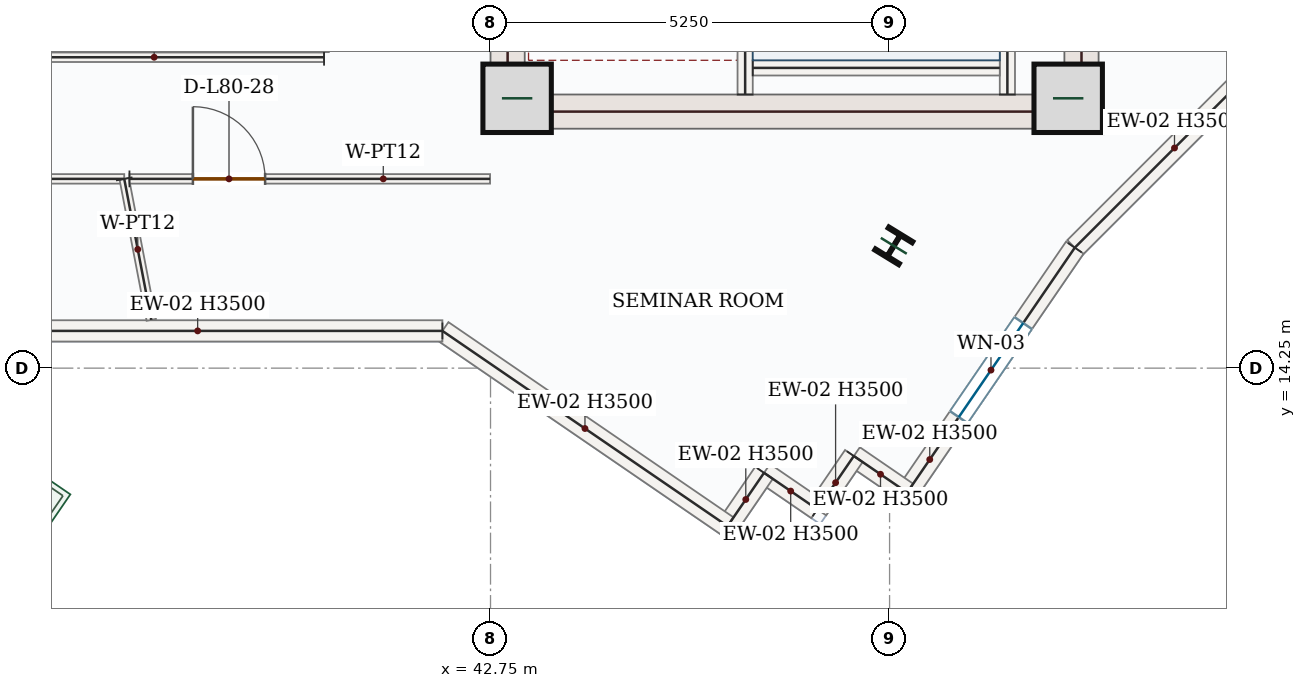
"""IFC4 building model, lengths in metres.
Left out: names, types, materials, properties, quantities, classifications, styles, units other than length and angle.
Written with IfcOpenShell. Run it as: python <this file> out.ifc"""

import sys

from ifc_helpers import new_model, si_unit, direction, frame, frame_2d, origin, origin_2d, place, context, subcontext, project, spatial, rectangle, i_section, extrude, source, transform, mapped, element, fill, save


model = new_model("IFC4")
c1 = context("Model", 3, precision=1e-05, world=origin(), true_north=direction((0.0, 1.0)))
c2 = subcontext(c1, "Body", "Model", "MODEL_VIEW")
j1 = project(units=[si_unit("LENGTHUNIT", "METRE"), si_unit("PLANEANGLEUNIT", "RADIAN")], contexts=[c1])
p1 = place(None, origin())
s1 = spatial("IfcSite", under=j1, at=p1, CompositionType="ELEMENT")
p2 = place(p1, origin())
s2 = spatial("IfcBuilding", under=s1, at=p2, CompositionType="ELEMENT")
p3 = place(p2, frame((0.0, 0.0, 331.05)))
s3 = spatial("IfcBuildingStorey", under=s2, at=p3, CompositionType="ELEMENT", Elevation=331.05)
p4 = place(p3, frame((42.975, 17.4, 0.0), z_axis=(0.0, 0.0, 1.0), x_axis=(0.0, 1.0, 0.0)))
e1 = element("IfcWall", 1, at=p4, inside=s3, PredefinedType="SHEAR", context=c2, shape_type="SweptSolid", body=[
    extrude(rectangle(XDim=8.55, YDim=0.45, at=frame_2d((4.275, 0.0))), origin(), (0.0, 0.0, 1.0), 3.5),
])
p5 = place(p4, frame((6.65, 0.0, 0.0)))
e2 = element("IfcOpeningElement", 2, at=p5, cuts=e1, PredefinedType="OPENING", context=c2, shape_type="SweptSolid", body=[
    extrude(rectangle(XDim=1.1, YDim=2.2, at=frame_2d((0.55, 1.1))), frame((0.0, 0.235, 0.0), z_axis=(0.0, -1.0, 0.0), x_axis=(1.0, 0.0, 0.0)), (0.0, 0.0, 1.0), 0.47),
])
p6 = place(p4, frame((1.75, 0.0, 0.0)))
e3 = element("IfcOpeningElement", 3, at=p6, cuts=e1, PredefinedType="OPENING", context=c2, shape_type="SweptSolid", body=[
    extrude(rectangle(XDim=1.3, YDim=2.2, at=frame_2d((0.65, 1.1))), frame((0.0, 0.235, 0.0), z_axis=(0.0, -1.0, 0.0), x_axis=(1.0, 0.0, 0.0)), (0.0, 0.0, 1.0), 0.47),
])
p7 = place(p4, frame((4.55, 0.0, 0.0)))
e4 = element("IfcOpeningElement", 4, at=p7, cuts=e1, PredefinedType="OPENING", context=c2, shape_type="SweptSolid", body=[
    extrude(rectangle(XDim=0.88, YDim=2.1, at=frame_2d((0.44, 1.05))), frame((0.0, 0.235, 0.0), z_axis=(0.0, -1.0, 0.0), x_axis=(1.0, 0.0, 0.0)), (0.0, 0.0, 1.0), 0.47),
])
m1 = source(origin(), c2, "Body", "SweptSolid", [
    extrude(rectangle(XDim=8.55, YDim=0.45, at=frame_2d((4.275, 0.0))), origin(), (0.0, 0.0, 1.0), 3.5),
])
p8 = place(p3, frame((50.525, 17.4, 0.0), z_axis=(0.0, 0.0, 1.0), x_axis=(0.0, 1.0, 0.0)))
e5 = element("IfcWall", 5, at=p8, inside=s3, PredefinedType="SHEAR", context=c2, shape_type="MappedRepresentation", body=[
    mapped(m1, transform((0.0, 0.0, 0.0), x_axis=(1.0, 0.0, 0.0), y_axis=(0.0, 1.0, 0.0), z_axis=(0.0, 0.0, 1.0), scale=1.0)),
])
m2 = source(origin(), c2, "Body", "SweptSolid", [
    extrude(rectangle(XDim=7.1, YDim=0.45, at=frame_2d((3.55, 0.0))), origin(), (0.0, 0.0, 1.0), 3.5),
])
p9 = place(p3, frame((43.2, 17.625, 0.0), z_axis=(0.0, 0.0, 1.0), x_axis=(1.0, 0.0, 0.0)))
e6 = element("IfcWall", 6, at=p9, inside=s3, PredefinedType="SHEAR", context=c2, shape_type="MappedRepresentation", body=[
    mapped(m2, transform((0.0, 0.0, 0.0), x_axis=(1.0, 0.0, 0.0), y_axis=(0.0, 1.0, 0.0), z_axis=(0.0, 0.0, 1.0), scale=1.0)),
])
m3 = source(origin(), c2, "Body", "SweptSolid", [
    extrude(rectangle(XDim=0.9, YDim=0.9, at=origin_2d()), origin(), (0.0, 0.0, 1.0), 3.75),
])
for number, where, z_axis, x_axis in (
    (7, (43.1, 17.8, 0.0), (0.0, 0.0, 1.0), (1.0, 0.0, 0.0)),
    (8, (50.35, 17.8, 0.0), (0.0, 0.0, 1.0), (1.0, 0.0, 0.0)),
):
    element("IfcColumn", number, at=place(p3, frame(where, z_axis=z_axis, x_axis=x_axis)), inside=s3, PredefinedType="COLUMN", context=c2, shape_type="MappedRepresentation", body=[
        mapped(m3, transform((0.0, 0.0, 0.0), x_axis=(1.0, 0.0, 0.0), y_axis=(0.0, 1.0, 0.0), z_axis=(0.0, 0.0, 1.0), scale=1.0)),
    ])
m4 = source(origin(), c2, "Body", "SweptSolid", [
    extrude(i_section(OverallWidth=0.369, OverallDepth=0.356, WebThickness=0.011, FlangeThickness=0.018, FilletRadius=0.018, at=origin_2d()), origin(), (0.0, 0.0, 1.0), 3.75),
])
p10 = place(p3, frame((48.055, 15.859, 0.0), z_axis=(0.0, 0.0, 1.0), x_axis=(-0.852640164354, 0.522498564716, 0.0)))
e9 = element("IfcColumn", 9, at=p10, inside=s3, PredefinedType="COLUMN", context=c2, shape_type="MappedRepresentation", body=[
    mapped(m4, transform((0.0, 0.0, 0.0), x_axis=(1.0, 0.0, 0.0), y_axis=(0.0, 1.0, 0.0), z_axis=(0.0, 0.0, 1.0), scale=1.0)),
])
m5 = source(origin(), c2, "Body", "SweptSolid", [
    extrude(rectangle(XDim=3.709, YDim=0.28, at=frame_2d((1.855, 0.0))), origin(), (0.0, 0.0, 1.0), 3.5),
])
p11 = place(p3, frame((53.06, 18.458, 0.0), z_axis=(0.0, 0.0, 1.0), x_axis=(-0.707106781187, -0.707106781187, 0.0)))
e10 = element("IfcWall", 10, at=p11, inside=s3, PredefinedType="SOLIDWALL", context=c2, shape_type="MappedRepresentation", body=[
    mapped(m5, transform((0.0, 0.0, 0.0), x_axis=(1.0, 0.0, 0.0), y_axis=(0.0, 1.0, 0.0), z_axis=(0.0, 0.0, 1.0), scale=1.0)),
])
p12 = place(p3, frame((50.437, 15.835, 0.0), z_axis=(0.0, 0.0, 1.0), x_axis=(-0.564961879511, -0.825117006672, 0.0)))
e11 = element("IfcWall", 11, at=p12, inside=s3, PredefinedType="SOLIDWALL", context=c2, shape_type="SweptSolid", body=[
    extrude(rectangle(XDim=3.904, YDim=0.28, at=frame_2d((1.952, 0.0))), origin(), (0.0, 0.0, 1.0), 3.5),
])
p13 = place(p12, frame((1.202, 0.0, 0.85)))
e12 = element("IfcOpeningElement", 12, at=p13, cuts=e11, PredefinedType="OPENING", context=c2, shape_type="SweptSolid", body=[
    extrude(rectangle(XDim=1.5, YDim=1.5, at=frame_2d((0.75, 0.75))), frame((0.0, 0.15, 0.0), z_axis=(0.0, -1.0, 0.0), x_axis=(1.0, 0.0, 0.0)), (0.0, 0.0, 1.0), 0.3),
])
m6 = source(origin(), c2, "Body", "SweptSolid", [
    extrude(rectangle(XDim=0.85, YDim=0.28, at=frame_2d((0.425, 0.0))), origin(), (0.0, 0.0, 1.0), 3.5),
])
for number, where, z_axis, x_axis in (
    (13, (48.231, 12.614, 0.0), (0.0, 0.0, 1.0), (-0.825, 0.565, 0.0)),
    (14, (47.53, 13.094, 0.0), (0.0, 0.0, 1.0), (-0.565, -0.825, 0.0)),
    (15, (47.05, 12.393, 0.0), (0.0, 0.0, 1.0), (-0.825, 0.565, 0.0)),
    (16, (46.348, 12.873, 0.0), (0.0, 0.0, 1.0), (-0.565, -0.825, 0.0)),
):
    element("IfcWall", number, at=place(p3, frame(where, z_axis=z_axis, x_axis=x_axis)), inside=s3, PredefinedType="SOLIDWALL", context=c2, shape_type="MappedRepresentation", body=[
        mapped(m6, transform((0.0, 0.0, 0.0), x_axis=(1.0, 0.0, 0.0), y_axis=(0.0, 1.0, 0.0), z_axis=(0.0, 0.0, 1.0), scale=1.0)),
    ])
m7 = source(origin(), c2, "Body", "SweptSolid", [
    extrude(rectangle(XDim=4.546, YDim=0.28, at=frame_2d((2.273, 0.0))), origin(), (0.0, 0.0, 1.0), 3.5),
])
p14 = place(p3, frame((45.868, 12.171, 0.0), z_axis=(0.0, 0.0, 1.0), x_axis=(-0.825104362901, 0.564980345075, 0.0)))
e17 = element("IfcWall", 17, at=p14, inside=s3, PredefinedType="SOLIDWALL", context=c2, shape_type="MappedRepresentation", body=[
    mapped(m7, transform((0.0, 0.0, 0.0), x_axis=(1.0, 0.0, 0.0), y_axis=(0.0, 1.0, 0.0), z_axis=(0.0, 0.0, 1.0), scale=1.0)),
])
m8 = source(origin(), c2, "Body", "SweptSolid", [
    extrude(rectangle(XDim=6.44, YDim=0.28, at=frame_2d((3.22, 0.0))), origin(), (0.0, 0.0, 1.0), 3.5),
])
p15 = place(p3, frame((42.117, 14.74, 0.0), z_axis=(0.0, 0.0, 1.0), x_axis=(-1.0, 0.0, 0.0)))
e18 = element("IfcWall", 18, at=p15, inside=s3, PredefinedType="SOLIDWALL", context=c2, shape_type="MappedRepresentation", body=[
    mapped(m8, transform((0.0, 0.0, 0.0), x_axis=(1.0, 0.0, 0.0), y_axis=(0.0, 1.0, 0.0), z_axis=(0.0, 0.0, 1.0), scale=1.0)),
])
m9 = source(origin(), c2, "Body", "SweptSolid", [
    extrude(rectangle(XDim=7.87, YDim=0.2, at=frame_2d((3.935, 0.0))), origin(), (0.0, 0.0, 1.0), 3.5),
])
p16 = place(p3, frame((49.55, 17.85, 0.0), z_axis=(0.0, 0.0, 1.0), x_axis=(0.0, 1.0, 0.0)))
e19 = element("IfcWall", 19, at=p16, inside=s3, PredefinedType="SOLIDWALL", context=c2, shape_type="MappedRepresentation", body=[
    mapped(m9, transform((0.0, 0.0, 0.0), x_axis=(1.0, 0.0, 0.0), y_axis=(0.0, 1.0, 0.0), z_axis=(0.0, 0.0, 1.0), scale=1.0)),
])
p17 = place(p3, frame((46.1, 17.85, 0.0), z_axis=(0.0, 0.0, 1.0), x_axis=(0.0, 1.0, 0.0)))
e20 = element("IfcWall", 20, at=p17, inside=s3, PredefinedType="SOLIDWALL", context=c2, shape_type="SweptSolid", body=[
    extrude(rectangle(XDim=8.0, YDim=0.2, at=frame_2d((4.0, 0.0))), origin(), (0.0, 0.0, 1.0), 3.5),
])
p18 = place(p17, frame((6.3, 0.0, 0.0)))
e21 = element("IfcOpeningElement", 21, at=p18, cuts=e20, PredefinedType="OPENING", context=c2, shape_type="SweptSolid", body=[
    extrude(rectangle(XDim=1.05, YDim=2.15, at=frame_2d((0.525, 1.075))), frame((0.0, 0.11, 0.0), z_axis=(0.0, -1.0, 0.0), x_axis=(1.0, 0.0, 0.0)), (0.0, 0.0, 1.0), 0.22),
])
m10 = source(origin(), c2, "Body", "SweptSolid", [
    extrude(rectangle(XDim=3.25, YDim=0.2, at=frame_2d((1.625, 0.0))), origin(), (0.0, 0.0, 1.0), 3.5),
])
p19 = place(p3, frame((46.2, 18.2, 0.0), z_axis=(0.0, 0.0, 1.0), x_axis=(1.0, 0.0, 0.0)))
e22 = element("IfcWall", 22, at=p19, inside=s3, PredefinedType="SOLIDWALL", context=c2, shape_type="MappedRepresentation", body=[
    mapped(m10, transform((0.0, 0.0, 0.0), x_axis=(1.0, 0.0, 0.0), y_axis=(0.0, 1.0, 0.0), z_axis=(0.0, 0.0, 1.0), scale=1.0)),
])
m11 = source(origin(), c2, "Body", "SweptSolid", [
    extrude(rectangle(XDim=4.47, YDim=0.125, at=frame_2d((2.235, 0.0))), origin(), (0.0, 0.0, 1.0), 3.5),
])
p20 = place(p3, frame((40.56, 18.34, 0.0), z_axis=(0.0, 0.0, 1.0), x_axis=(-1.0, 0.0, 0.0)))
e23 = element("IfcWall", 23, at=p20, inside=s3, PredefinedType="PARTITIONING", context=c2, shape_type="MappedRepresentation", body=[
    mapped(m11, transform((0.0, 0.0, 0.0), x_axis=(1.0, 0.0, 0.0), y_axis=(0.0, 1.0, 0.0), z_axis=(0.0, 0.0, 1.0), scale=1.0)),
])
p21 = place(p3, frame((32.235, 16.74, 0.0), z_axis=(0.0, 0.0, 1.0), x_axis=(1.0, 0.0, 0.0)))
e24 = element("IfcWall", 24, at=p21, inside=s3, PredefinedType="PARTITIONING", context=c2, shape_type="SweptSolid", body=[
    extrude(rectangle(XDim=5.696, YDim=0.125, at=frame_2d((2.848, 0.0))), origin(), (0.0, 0.0, 1.0), 3.5),
])
p22 = place(p21, frame((3.085, 0.0, 0.0)))
e25 = element("IfcOpeningElement", 25, at=p22, cuts=e24, PredefinedType="OPENING", context=c2, shape_type="SweptSolid", body=[
    extrude(rectangle(XDim=0.95, YDim=2.15, at=frame_2d((0.475, 1.075))), frame((0.0, 0.073, 0.0), z_axis=(0.0, -1.0, 0.0), x_axis=(1.0, 0.0, 0.0)), (0.0, 0.0, 1.0), 0.145),
])
m12 = source(origin(), c2, "Body", "SweptSolid", [
    extrude(rectangle(XDim=1.889, YDim=0.125, at=frame_2d((0.944, 0.0))), origin(), (0.0, 0.0, 1.0), 3.5),
])
p23 = place(p3, frame((37.931, 16.74, 0.0), z_axis=(0.0, 0.0, 1.0), x_axis=(0.188454265316, -0.982081966989, 0.0)))
e26 = element("IfcWall", 26, at=p23, inside=s3, PredefinedType="PARTITIONING", context=c2, shape_type="MappedRepresentation", body=[
    mapped(m12, transform((0.0, 0.0, 0.0), x_axis=(1.0, 0.0, 0.0), y_axis=(0.0, 1.0, 0.0), z_axis=(0.0, 0.0, 1.0), scale=1.0)),
])
p24 = place(p3, frame((38.0, 16.74, 0.0), z_axis=(0.0, 0.0, 1.0), x_axis=(1.0, 0.0, 0.0)))
e27 = element("IfcWall", 27, at=p24, inside=s3, PredefinedType="PARTITIONING", context=c2, shape_type="SweptSolid", body=[
    extrude(rectangle(XDim=4.744, YDim=0.125, at=frame_2d((2.372, 0.0))), origin(), (0.0, 0.0, 1.0), 3.5),
])
p25 = place(p24, frame((0.835, 0.0, 0.0)))
e28 = element("IfcOpeningElement", 28, at=p25, cuts=e27, PredefinedType="OPENING", context=c2, shape_type="SweptSolid", body=[
    extrude(rectangle(XDim=0.95, YDim=2.15, at=frame_2d((0.475, 1.075))), frame((0.0, 0.073, 0.0), z_axis=(0.0, -1.0, 0.0), x_axis=(1.0, 0.0, 0.0)), (0.0, 0.0, 1.0), 0.145),
])
m13 = source(origin(), c2, "Body", "SweptSolid", [
    extrude(rectangle(XDim=1.5, YDim=1.5, at=frame_2d((0.75, 0.75))), frame((0.0, 0.03, 0.0), z_axis=(0.0, -1.0, 0.0), x_axis=(1.0, 0.0, 0.0)), (0.0, 0.0, 1.0), 0.06),
])
p26 = place(p13, origin())
e29 = element("IfcWindow", 29, at=p26, inside=s3, PartitioningType="SINGLE_PANEL", PredefinedType="WINDOW", context=c2, shape_type="MappedRepresentation", body=[
    mapped(m13, transform((0.0, 0.0, 0.0), x_axis=(1.0, 0.0, 0.0), y_axis=(0.0, 1.0, 0.0), z_axis=(0.0, 0.0, 1.0), scale=1.0)),
])
fill(e12, e29)
m14 = source(origin(), c2, "Body", "SweptSolid", [
    extrude(rectangle(XDim=0.95, YDim=2.15, at=frame_2d((0.475, 1.075))), frame((0.0, 0.025, 0.0), z_axis=(0.0, -1.0, 0.0), x_axis=(1.0, 0.0, 0.0)), (0.0, 0.0, 1.0), 0.05),
])
p27 = place(p25, origin())
e30 = element("IfcDoor", 30, at=p27, inside=s3, OperationType="SINGLE_SWING_LEFT", PredefinedType="DOOR", context=c2, shape_type="MappedRepresentation", body=[
    mapped(m14, transform((0.0, 0.0, 0.0), x_axis=(1.0, 0.0, 0.0), y_axis=(0.0, 1.0, 0.0), z_axis=(0.0, 0.0, 1.0), scale=1.0)),
])
fill(e28, e30)
save(model, sys.argv[1])
